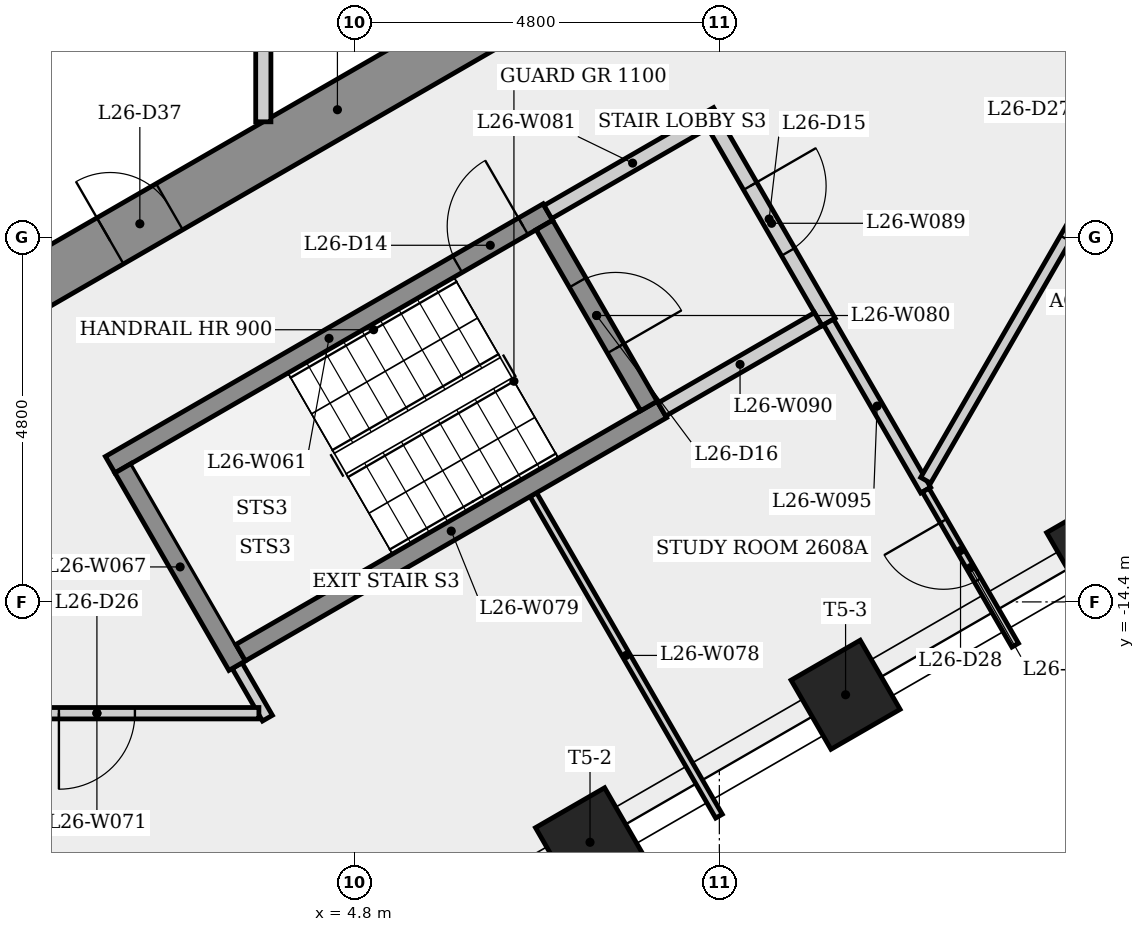
"""IFC4 building model, lengths in metres.
Left out: names, types, materials, properties, quantities, classifications, styles, units other than length and angle.
Written with IfcOpenShell. Run it as: python <this file> out.ifc"""

import sys

from ifc_helpers import new_model, si_unit, direction, frame, frame_2d, origin, origin_2d, place, context, subcontext, project, spatial, rectangle, extrude, element, fill, save


model = new_model("IFC4")
c1 = context("Model", 3, precision=1e-05, world=origin(), true_north=direction((0.0, 1.0)))
c2 = subcontext(c1, "Body", "Model", "MODEL_VIEW")
j1 = project(units=[si_unit("LENGTHUNIT", "METRE"), si_unit("PLANEANGLEUNIT", "RADIAN")], contexts=[c1])
p1 = place(None, origin())
s1 = spatial("IfcSite", under=j1, at=p1, CompositionType="ELEMENT")
p2 = place(p1, origin())
s2 = spatial("IfcBuilding", under=s1, at=p2, CompositionType="ELEMENT")
p3 = place(p2, frame((0.0, 0.0, 100.1)))
s3 = spatial("IfcBuildingStorey", under=s2, at=p3, CompositionType="ELEMENT", Elevation=100.1)
p4 = place(p3, frame((-0.175, -10.667, 0.0), z_axis=(0.0, 0.0, 1.0), x_axis=(0.866023993627, 0.500002442456, 0.0)))
e1 = element("IfcWall", 1, at=p4, inside=s3, PredefinedType="SHEAR", context=c2, shape_type="SweptSolid", body=[
    extrude(rectangle(XDim=10.97, YDim=0.7, at=frame_2d((5.485, 0.0))), origin(), (0.0, 0.0, 1.0), 3.4),
])
p5 = place(p4, frame((2.033, 0.0, 0.0)))
e2 = element("IfcOpeningElement", 2, at=p5, cuts=e1, PredefinedType="OPENING", context=c2, shape_type="SweptSolid", body=[
    extrude(rectangle(XDim=0.9, YDim=2.1, at=frame_2d((0.45, 1.05))), frame((0.0, 0.36, 0.0), z_axis=(0.0, -1.0, 0.0), x_axis=(1.0, 0.0, 0.0)), (0.0, 0.0, 1.0), 0.72),
])
p6 = place(p4, frame((8.754, 0.0, 0.0)))
e3 = element("IfcOpeningElement", 3, at=p6, cuts=e1, PredefinedType="OPENING", context=c2, shape_type="SweptSolid", body=[
    extrude(rectangle(XDim=0.9, YDim=2.1, at=frame_2d((0.45, 1.05))), frame((0.0, 0.36, 0.0), z_axis=(0.0, -1.0, 0.0), x_axis=(1.0, 0.0, 0.0)), (0.0, 0.0, 1.0), 0.72),
])
for number, where, z_axis, x_axis in (
    (4, (7.898, -17.563, 0.0), (0.0, 0.0, 1.0), (0.5, -0.866, 0.0)),
    (5, (11.261, -15.622, 0.0), (0.0, 0.0, 1.0), (0.5, -0.866, 0.0)),
    (6, (14.623, -13.68, 0.0), (0.0, 0.0, 1.0), (0.5, -0.866, 0.0)),
):
    element("IfcColumn", number, at=place(p3, frame(where, z_axis=z_axis, x_axis=x_axis)), inside=s3, PredefinedType="COLUMN", context=c2, shape_type="SweptSolid", body=[
        extrude(rectangle(XDim=1.05, YDim=1.05, at=origin_2d()), origin(), (0.0, 0.0, 1.0), 3.4),
    ])
p7 = place(p3, frame((1.585, -12.595, 0.0), z_axis=(0.0, 0.0, 1.0), x_axis=(0.866036417653, 0.499980922934, 0.0)))
e7 = element("IfcWall", 7, at=p7, inside=s3, PredefinedType="SHEAR", context=c2, shape_type="SweptSolid", body=[
    extrude(rectangle(XDim=6.65, YDim=0.25, at=frame_2d((3.325, 0.0))), origin(), (0.0, 0.0, 1.0), 3.05),
])
p8 = place(p7, frame((5.275, 0.0, 0.0)))
e8 = element("IfcOpeningElement", 8, at=p8, cuts=e7, PredefinedType="OPENING", context=c2, shape_type="SweptSolid", body=[
    extrude(rectangle(XDim=1.0, YDim=2.1, at=frame_2d((0.5, 1.05))), frame((0.0, 0.135, 0.0), z_axis=(0.0, -1.0, 0.0), x_axis=(1.0, 0.0, 0.0)), (0.0, 0.0, 1.0), 0.27),
])
p9 = place(p3, frame((3.256, -15.239, 0.0), z_axis=(0.0, 0.0, 1.0), x_axis=(0.499925626596, -0.866068339032, 0.0)))
e9 = element("IfcWall", 9, at=p9, inside=s3, PredefinedType="PARTITIONING", context=c2, shape_type="SweptSolid", body=[
    extrude(rectangle(XDim=0.797, YDim=0.15, at=frame_2d((0.399, 0.0))), origin(), (0.0, 0.0, 1.0), 3.05),
])
p10 = place(p3, frame((3.256, -15.239, 0.0), z_axis=(0.0, 0.0, 1.0), x_axis=(-0.50002537861, 0.866010750942, 0.0)))
e10 = element("IfcWall", 10, at=p10, inside=s3, PredefinedType="SHEAR", context=c2, shape_type="SweptSolid", body=[
    extrude(rectangle(XDim=3.0, YDim=0.25, at=frame_2d((1.5, 0.0))), origin(), (0.0, 0.0, 1.0), 3.05),
])
p11 = place(p3, frame((3.6, -5.275, 0.0), z_axis=(0.0, 0.0, 1.0), x_axis=(0.0, -1.0, 0.0)))
e11 = element("IfcWall", 11, at=p11, inside=s3, PredefinedType="PARTITIONING", context=c2, shape_type="SweptSolid", body=[
    extrude(rectangle(XDim=2.808, YDim=0.2, at=frame_2d((1.404, 0.0))), origin(), (0.0, 0.0, 1.0), 3.05),
])
p12 = place(p3, frame((3.542, -15.865, 0.0), z_axis=(0.0, 0.0, 1.0), x_axis=(-1.0, 0.0, 0.0)))
e12 = element("IfcWall", 12, at=p12, inside=s3, PredefinedType="PARTITIONING", context=c2, shape_type="SweptSolid", body=[
    extrude(rectangle(XDim=4.263, YDim=0.15, at=frame_2d((2.131, 0.0))), origin(), (0.0, 0.0, 1.0), 3.05),
])
p13 = place(p12, frame((1.631, 0.0, 0.0)))
e13 = element("IfcOpeningElement", 13, at=p13, cuts=e12, PredefinedType="OPENING", context=c2, shape_type="SweptSolid", body=[
    extrude(rectangle(XDim=1.0, YDim=2.1, at=frame_2d((0.5, 1.05))), frame((0.0, 0.085, 0.0), z_axis=(0.0, -1.0, 0.0), x_axis=(1.0, 0.0, 0.0)), (0.0, 0.0, 1.0), 0.17),
])
p14 = place(p3, frame((7.153, -12.989, 0.0), z_axis=(0.0, 0.0, 1.0), x_axis=(0.500025283505, -0.866010805854, 0.0)))
e14 = element("IfcWall", 14, at=p14, inside=s3, PredefinedType="PARTITIONING", context=c2, shape_type="SweptSolid", body=[
    extrude(rectangle(XDim=4.885, YDim=0.1, at=frame_2d((2.442, 0.0))), origin(), (0.0, 0.0, 1.0), 3.05),
])
p15 = place(p3, frame((3.301, -15.068, 0.0), z_axis=(0.0, 0.0, 1.0), x_axis=(0.866035036182, 0.499983315828, 0.0)))
e15 = element("IfcWall", 15, at=p15, inside=s3, PredefinedType="SHEAR", context=c2, shape_type="SweptSolid", body=[
    extrude(rectangle(XDim=6.4, YDim=0.25, at=frame_2d((3.2, 0.0))), origin(), (0.0, 0.0, 1.0), 3.05),
])
p16 = place(p3, frame((7.298, -9.441, 0.0), z_axis=(0.0, 0.0, 1.0), x_axis=(0.500034990121, -0.866005201286, 0.0)))
e16 = element("IfcWall", 16, at=p16, inside=s3, PredefinedType="SHEAR", context=c2, shape_type="SweptSolid", body=[
    extrude(rectangle(XDim=2.75, YDim=0.25, at=frame_2d((1.375, 0.0))), origin(), (0.0, 0.0, 1.0), 3.05),
])
p17 = place(p16, frame((0.875, 0.0, 0.0)))
e17 = element("IfcOpeningElement", 17, at=p17, cuts=e16, PredefinedType="OPENING", context=c2, shape_type="SweptSolid", body=[
    extrude(rectangle(XDim=1.0, YDim=2.1, at=frame_2d((0.5, 1.05))), frame((0.0, 0.135, 0.0), z_axis=(0.0, -1.0, 0.0), x_axis=(1.0, 0.0, 0.0)), (0.0, 0.0, 1.0), 0.27),
])
p18 = place(p3, frame((7.344, -9.27, 0.0), z_axis=(0.0, 0.0, 1.0), x_axis=(0.866005588531, 0.500034319456, 0.0)))
e18 = element("IfcWall", 18, at=p18, inside=s3, PredefinedType="PARTITIONING", context=c2, shape_type="SweptSolid", body=[
    extrude(rectangle(XDim=2.575, YDim=0.2, at=frame_2d((1.288, 0.0))), origin(), (0.0, 0.0, 1.0), 3.05),
])
p19 = place(p3, frame((9.537, -8.119, 0.0), z_axis=(0.0, 0.0, 1.0), x_axis=(0.499990139034, -0.866031096941, 0.0)))
e19 = element("IfcWall", 19, at=p19, inside=s3, PredefinedType="PARTITIONING", context=c2, shape_type="SweptSolid", body=[
    extrude(rectangle(XDim=3.0, YDim=0.2, at=frame_2d((1.5, 0.0))), origin(), (0.0, 0.0, 1.0), 3.05),
])
p20 = place(p19, frame((0.935, 0.0, 0.0)))
e20 = element("IfcOpeningElement", 20, at=p20, cuts=e19, PredefinedType="OPENING", context=c2, shape_type="SweptSolid", body=[
    extrude(rectangle(XDim=1.0, YDim=2.1, at=frame_2d((0.5, 1.05))), frame((0.0, 0.11, 0.0), z_axis=(0.0, -1.0, 0.0), x_axis=(1.0, 0.0, 0.0)), (0.0, 0.0, 1.0), 0.22),
])
p21 = place(p3, frame((10.901, -10.681, 0.0), z_axis=(0.0, 0.0, 1.0), x_axis=(-0.866007538022, -0.500030943131, 0.0)))
e21 = element("IfcWall", 21, at=p21, inside=s3, PredefinedType="PARTITIONING", context=c2, shape_type="SweptSolid", body=[
    extrude(rectangle(XDim=2.375, YDim=0.2, at=frame_2d((1.188, 0.0))), origin(), (0.0, 0.0, 1.0), 3.05),
])
p22 = place(p3, frame((12.315, -12.929, 0.0), z_axis=(0.0, 0.0, 1.0), x_axis=(-0.500003717096, 0.866023257707, 0.0)))
e22 = element("IfcWall", 22, at=p22, inside=s3, PredefinedType="PARTITIONING", context=c2, shape_type="SweptSolid", body=[
    extrude(rectangle(XDim=2.555, YDim=0.15, at=frame_2d((1.277, 0.0))), origin(), (0.0, 0.0, 1.0), 3.05),
])
p23 = place(p3, frame((13.492, -14.969, 0.0), z_axis=(0.0, 0.0, 1.0), x_axis=(-0.499940797434, 0.866059581704, 0.0)))
e23 = element("IfcWall", 23, at=p23, inside=s3, PredefinedType="PARTITIONING", context=c2, shape_type="SweptSolid", body=[
    extrude(rectangle(XDim=2.355, YDim=0.1, at=frame_2d((1.178, 0.0))), origin(), (0.0, 0.0, 1.0), 3.05),
])
p24 = place(p23, frame((0.988, 0.0, 0.0)))
e24 = element("IfcOpeningElement", 24, at=p24, cuts=e23, PredefinedType="OPENING", context=c2, shape_type="SweptSolid", body=[
    extrude(rectangle(XDim=0.9, YDim=2.1, at=frame_2d((0.45, 1.05))), frame((0.0, 0.06, 0.0), z_axis=(0.0, -1.0, 0.0), x_axis=(1.0, 0.0, 0.0)), (0.0, 0.0, 1.0), 0.12),
])
p25 = place(p3, frame((16.489, -5.57, 0.0), z_axis=(0.0, 0.0, 1.0), x_axis=(-0.499989116703, -0.866031687168, 0.0)))
e25 = element("IfcWall", 25, at=p25, inside=s3, PredefinedType="PARTITIONING", context=c2, shape_type="SweptSolid", body=[
    extrude(rectangle(XDim=8.348, YDim=0.15, at=frame_2d((4.174, 0.0))), origin(), (0.0, 0.0, 1.0), 3.05),
])
p26 = place(p25, frame((3.674, 0.0, 0.0)))
e26 = element("IfcOpeningElement", 26, at=p26, cuts=e25, PredefinedType="OPENING", context=c2, shape_type="SweptSolid", body=[
    extrude(rectangle(XDim=1.0, YDim=2.1, at=frame_2d((0.5, 1.05))), frame((0.0, 0.085, 0.0), z_axis=(0.0, -1.0, 0.0), x_axis=(1.0, 0.0, 0.0)), (0.0, 0.0, 1.0), 0.17),
])
p27 = place(p8, origin())
e27 = element("IfcDoor", 27, at=p27, inside=s3, OperationType="SINGLE_SWING_RIGHT", PredefinedType="DOOR", context=c2, shape_type="SweptSolid", body=[
    extrude(rectangle(XDim=1.0, YDim=2.1, at=frame_2d((0.5, 1.05))), frame((0.0, 0.025, 0.0), z_axis=(0.0, -1.0, 0.0), x_axis=(1.0, 0.0, 0.0)), (0.0, 0.0, 1.0), 0.05),
])
fill(e8, e27)
p28 = place(p20, origin())
e28 = element("IfcDoor", 28, at=p28, inside=s3, OperationType="SINGLE_SWING_LEFT", PredefinedType="DOOR", context=c2, shape_type="SweptSolid", body=[
    extrude(rectangle(XDim=1.0, YDim=2.1, at=frame_2d((0.5, 1.05))), frame((0.0, 0.025, 0.0), z_axis=(0.0, -1.0, 0.0), x_axis=(1.0, 0.0, 0.0)), (0.0, 0.0, 1.0), 0.05),
])
fill(e20, e28)
p29 = place(p17, origin())
e29 = element("IfcDoor", 29, at=p29, inside=s3, OperationType="SINGLE_SWING_RIGHT", PredefinedType="DOOR", context=c2, shape_type="SweptSolid", body=[
    extrude(rectangle(XDim=1.0, YDim=2.1, at=frame_2d((0.5, 1.05))), frame((0.0, 0.025, 0.0), z_axis=(0.0, -1.0, 0.0), x_axis=(1.0, 0.0, 0.0)), (0.0, 0.0, 1.0), 0.05),
])
fill(e17, e29)
p30 = place(p13, origin())
e30 = element("IfcDoor", 30, at=p30, inside=s3, OperationType="SINGLE_SWING_RIGHT", PredefinedType="DOOR", context=c2, shape_type="SweptSolid", body=[
    extrude(rectangle(XDim=1.0, YDim=2.1, at=frame_2d((0.5, 1.05))), frame((0.0, 0.025, 0.0), z_axis=(0.0, -1.0, 0.0), x_axis=(1.0, 0.0, 0.0)), (0.0, 0.0, 1.0), 0.05),
])
fill(e13, e30)
p31 = place(p26, origin())
e31 = element("IfcDoor", 31, at=p31, inside=s3, OperationType="SINGLE_SWING_LEFT", PredefinedType="DOOR", context=c2, shape_type="SweptSolid", body=[
    extrude(rectangle(XDim=1.0, YDim=2.1, at=frame_2d((0.5, 1.05))), frame((0.0, 0.025, 0.0), z_axis=(0.0, -1.0, 0.0), x_axis=(1.0, 0.0, 0.0)), (0.0, 0.0, 1.0), 0.05),
])
fill(e26, e31)
p32 = place(p24, origin())
e32 = element("IfcDoor", 32, at=p32, inside=s3, OperationType="SINGLE_SWING_RIGHT", PredefinedType="DOOR", context=c2, shape_type="SweptSolid", body=[
    extrude(rectangle(XDim=0.9, YDim=2.1, at=frame_2d((0.45, 1.05))), frame((0.0, 0.025, 0.0), z_axis=(0.0, -1.0, 0.0), x_axis=(1.0, 0.0, 0.0)), (0.0, 0.0, 1.0), 0.05),
])
fill(e24, e32)
p33 = place(p5, origin())
e33 = element("IfcDoor", 33, at=p33, inside=s3, OperationType="SINGLE_SWING_LEFT", PredefinedType="DOOR", context=c2, shape_type="SweptSolid", body=[
    extrude(rectangle(XDim=0.9, YDim=2.1, at=frame_2d((0.45, 1.05))), frame((0.0, 0.025, 0.0), z_axis=(0.0, -1.0, 0.0), x_axis=(1.0, 0.0, 0.0)), (0.0, 0.0, 1.0), 0.05),
])
fill(e2, e33)
save(model, sys.argv[1])
